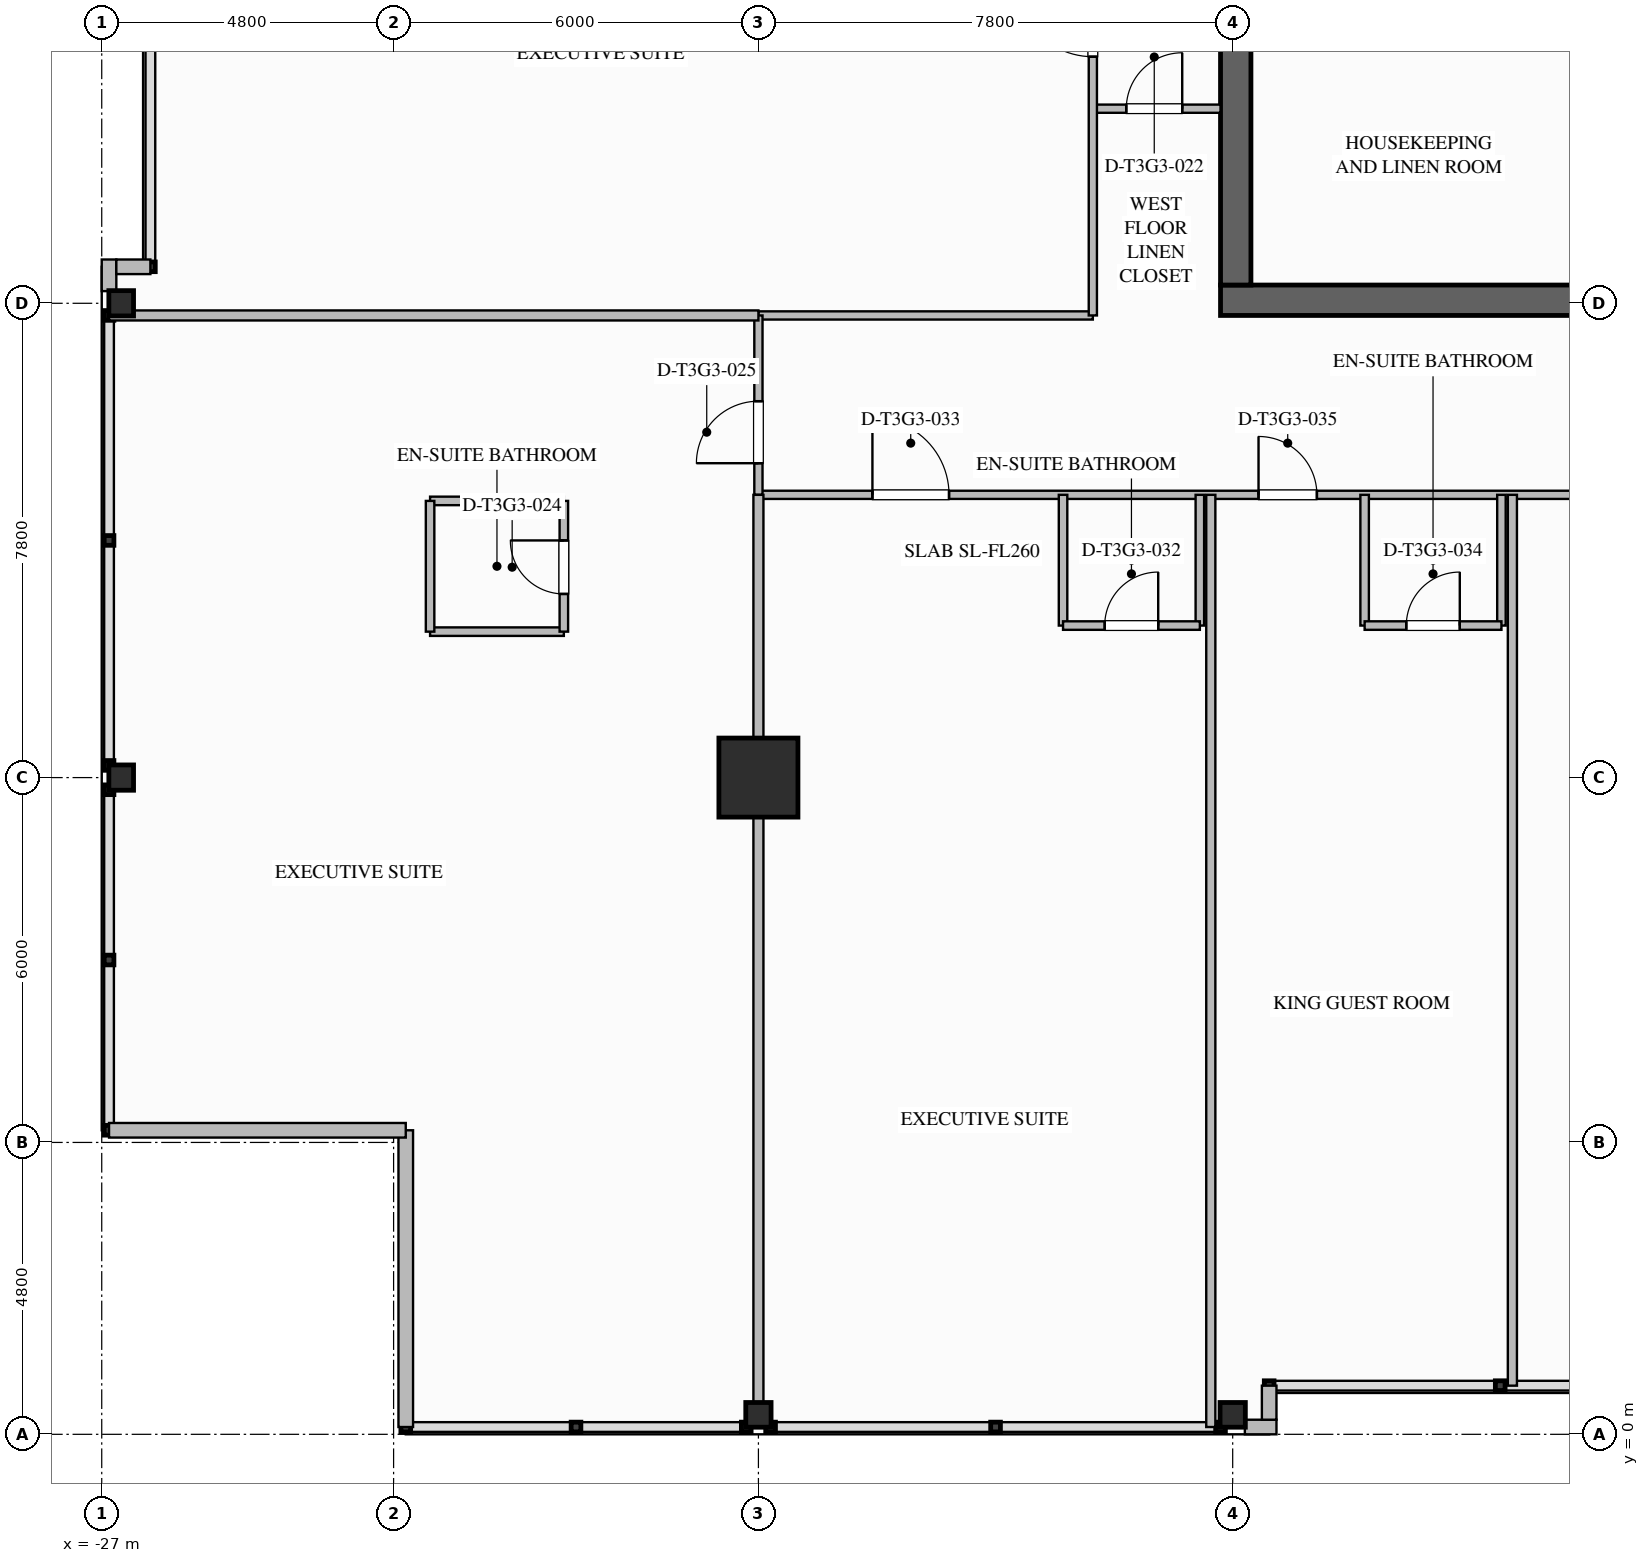
"""IFC4 building model, lengths in metres.
Left out: names, types, materials, properties, quantities, classifications, styles, units other than length and angle.
Written with IfcOpenShell. Run it as: python <this file> out.ifc"""

import sys

from ifc_helpers import new_model, si_unit, direction, frame, frame_2d, origin, origin_2d, place, context, subcontext, project, spatial, rectangle, i_section, extrude, element, fill, save


model = new_model("IFC4")
c1 = context("Model", 3, precision=1e-05, world=origin(), true_north=direction((0.0, 1.0)))
c2 = subcontext(c1, "Body", "Model", "MODEL_VIEW")
j1 = project(units=[si_unit("LENGTHUNIT", "METRE"), si_unit("PLANEANGLEUNIT", "RADIAN")], contexts=[c1])
p1 = place(None, origin())
s1 = spatial("IfcSite", under=j1, at=p1, CompositionType="ELEMENT")
p2 = place(p1, origin())
s2 = spatial("IfcBuilding", under=s1, at=p2, CompositionType="ELEMENT")
p3 = place(p2, frame((0.0, 0.0, 171.7)))
s3 = spatial("IfcBuildingStorey", under=s2, at=p3, CompositionType="ELEMENT", Elevation=171.7)
p4 = place(p3, frame((8.6, 18.65, 0.0), z_axis=(0.0, 0.0, 1.0), x_axis=(-1.0, 0.0, 0.0)))
e1 = element("IfcWall", 1, at=p4, inside=s3, PredefinedType="SHEAR", context=c2, shape_type="SweptSolid", body=[
    extrude(rectangle(XDim=17.2, YDim=0.5, at=frame_2d((8.6, 0.0))), origin(), (0.0, 0.0, 1.0), 3.55),
])
p5 = place(p3, frame((-8.35, 18.9, 0.0), z_axis=(0.0, 0.0, 1.0), x_axis=(0.0, 1.0, 0.0)))
e2 = element("IfcWall", 2, at=p5, inside=s3, PredefinedType="SHEAR", context=c2, shape_type="SweptSolid", body=[
    extrude(rectangle(XDim=16.2, YDim=0.5, at=frame_2d((8.1, 0.0))), origin(), (0.0, 0.0, 1.0), 3.55),
])
p6 = place(p5, frame((12.02, 0.0, 0.0)))
e3 = element("IfcOpeningElement", 3, at=p6, cuts=e2, PredefinedType="OPENING", context=c2, shape_type="SweptSolid", body=[
    extrude(rectangle(XDim=1.08, YDim=2.04, at=frame_2d((0.54, 1.02))), frame((0.0, 0.26, 0.0), z_axis=(0.0, -1.0, 0.0), x_axis=(1.0, 0.0, 0.0)), (0.0, 0.0, 1.0), 0.52),
])
p7 = place(p5, frame((4.5, 0.0, 0.0)))
e4 = element("IfcOpeningElement", 4, at=p7, cuts=e2, PredefinedType="OPENING", context=c2, shape_type="SweptSolid", body=[
    extrude(rectangle(XDim=1.08, YDim=2.04, at=frame_2d((0.54, 1.02))), frame((0.0, 0.26, 0.0), z_axis=(0.0, -1.0, 0.0), x_axis=(1.0, 0.0, 0.0)), (0.0, 0.0, 1.0), 0.52),
])
p8 = place(p3, frame((-16.2, 10.8, 0.0), z_axis=(0.0, 0.0, 1.0), x_axis=(1.0, 0.0, 0.0)))
e5 = element("IfcColumn", 5, at=p8, inside=s3, PredefinedType="COLUMN", context=c2, shape_type="SweptSolid", body=[
    extrude(rectangle(XDim=1.3, YDim=1.3, at=origin_2d()), origin(), (0.0, 0.0, 1.0), 3.55),
])
for number, where, z_axis, x_axis in (
    (6, (-26.68, 10.8, 0.0), (0.0, 0.0, 1.0), (1.0, 0.0, 0.0)),
    (7, (-26.68, 18.6, 0.0), (0.0, 0.0, 1.0), (1.0, 0.0, 0.0)),
    (8, (-16.2, 0.32, 0.0), (0.0, 0.0, 1.0), (0.0, 1.0, 0.0)),
    (9, (-8.4, 0.32, 0.0), (0.0, 0.0, 1.0), (0.0, 1.0, 0.0)),
):
    element("IfcColumn", number, at=place(p3, frame(where, z_axis=z_axis, x_axis=x_axis)), inside=s3, PredefinedType="COLUMN", context=c2, shape_type="SweptSolid", body=[
        extrude(i_section(OverallWidth=0.406, OverallDepth=0.416, WebThickness=0.03, FlangeThickness=0.048, FilletRadius=0.028, at=origin_2d()), origin(), (0.0, 0.0, 1.0), 3.547),
    ])
for number, where, z_axis, x_axis in (
    (10, (-26.88, 18.8, 0.0), (0.0, 0.0, 1.0), (0.0, 1.0, 0.0)),
    (11, (-7.68, 0.12, 0.0), (0.0, 0.0, 1.0), (-1.0, 0.0, 0.0)),
):
    element("IfcWall", number, at=place(p3, frame(where, z_axis=z_axis, x_axis=x_axis)), inside=s3, PredefinedType="STANDARD", context=c2, shape_type="SweptSolid", body=[
        extrude(rectangle(XDim=0.52, YDim=0.24, at=frame_2d((0.26, 0.0))), origin(), (0.0, 0.0, 1.0), 3.29),
    ])
for number, where, z_axis, x_axis in (
    (12, (-22.0, 0.12, 0.0), (0.0, 0.0, 1.0), (0.0, 1.0, 0.0)),
    (13, (-22.0, 5.0, 0.0), (0.0, 0.0, 1.0), (-1.0, 0.0, 0.0)),
):
    element("IfcWall", number, at=place(p3, frame(where, z_axis=z_axis, x_axis=x_axis)), inside=s3, PredefinedType="STANDARD", context=c2, shape_type="SweptSolid", body=[
        extrude(rectangle(XDim=4.88, YDim=0.24, at=frame_2d((2.44, 0.0))), origin(), (0.0, 0.0, 1.0), 3.29),
    ])
for number, where, z_axis, x_axis in (
    (14, (-26.76, 19.2, 0.0), (0.0, 0.0, 1.0), (1.0, 0.0, 0.0)),
    (15, (-7.8, 0.8, 0.0), (0.0, 0.0, 1.0), (0.0, -1.0, 0.0)),
):
    element("IfcWall", number, at=place(p3, frame(where, z_axis=z_axis, x_axis=x_axis)), inside=s3, PredefinedType="STANDARD", context=c2, shape_type="SweptSolid", body=[
        extrude(rectangle(XDim=0.56, YDim=0.24, at=frame_2d((0.28, 0.0))), origin(), (0.0, 0.0, 1.0), 3.29),
    ])
p9 = place(p3, frame((-10.7, 21.8, 0.0), z_axis=(0.0, 0.0, 1.0), x_axis=(1.0, 0.0, 0.0)))
e16 = element("IfcWall", 16, at=p9, inside=s3, PredefinedType="PARTITIONING", context=c2, shape_type="SweptSolid", body=[
    extrude(rectangle(XDim=2.1, YDim=0.135, at=frame_2d((1.05, 0.0))), origin(), (0.0, 0.0, 1.0), 3.29),
])
p10 = place(p9, frame((0.55, 0.0, 0.0)))
e17 = element("IfcOpeningElement", 17, at=p10, cuts=e16, PredefinedType="OPENING", context=c2, shape_type="SweptSolid", body=[
    extrude(rectangle(XDim=0.92, YDim=2.1, at=frame_2d((0.46, 1.05))), frame((0.0, 0.077, 0.0), z_axis=(0.0, -1.0, 0.0), x_axis=(1.0, 0.0, 0.0)), (0.0, 0.0, 1.0), 0.155),
])
p11 = place(p3, frame((-16.2, 18.4, 0.0), z_axis=(0.0, 0.0, 1.0), x_axis=(1.0, 0.0, 0.0)))
e18 = element("IfcWall", 18, at=p11, inside=s3, PredefinedType="PARTITIONING", context=c2, shape_type="SweptSolid", body=[
    extrude(rectangle(XDim=5.5, YDim=0.135, at=frame_2d((2.75, 0.0))), origin(), (0.0, 0.0, 1.0), 2.667),
])
p12 = place(p3, frame((-16.2, 15.45, 0.0), z_axis=(0.0, 0.0, 1.0), x_axis=(1.0, 0.0, 0.0)))
e19 = element("IfcWall", 19, at=p12, inside=s3, PredefinedType="PARTITIONING", context=c2, shape_type="SweptSolid", body=[
    extrude(rectangle(XDim=24.8, YDim=0.135, at=frame_2d((12.4, 0.0))), origin(), (0.0, 0.0, 1.0), 3.29),
])
p13 = place(p12, frame((1.875, 0.0, 0.0)))
e20 = element("IfcOpeningElement", 20, at=p13, cuts=e19, PredefinedType="OPENING", context=c2, shape_type="SweptSolid", body=[
    extrude(rectangle(XDim=1.26, YDim=2.2, at=frame_2d((0.63, 1.1))), frame((0.0, 0.077, 0.0), z_axis=(0.0, -1.0, 0.0), x_axis=(1.0, 0.0, 0.0)), (0.0, 0.0, 1.0), 0.155),
])
p14 = place(p12, frame((8.225, 0.0, 0.0)))
e21 = element("IfcOpeningElement", 21, at=p14, cuts=e19, PredefinedType="OPENING", context=c2, shape_type="SweptSolid", body=[
    extrude(rectangle(XDim=0.96, YDim=2.15, at=frame_2d((0.48, 1.075))), frame((0.0, 0.077, 0.0), z_axis=(0.0, -1.0, 0.0), x_axis=(1.0, 0.0, 0.0)), (0.0, 0.0, 1.0), 0.155),
])
p15 = place(p12, frame((13.745, 0.0, 0.0)))
e22 = element("IfcOpeningElement", 22, at=p15, cuts=e19, PredefinedType="OPENING", context=c2, shape_type="SweptSolid", body=[
    extrude(rectangle(XDim=1.26, YDim=2.2, at=frame_2d((0.63, 1.1))), frame((0.0, 0.077, 0.0), z_axis=(0.0, -1.0, 0.0), x_axis=(1.0, 0.0, 0.0)), (0.0, 0.0, 1.0), 0.155),
])
p16 = place(p12, frame((19.945, 0.0, 0.0)))
e23 = element("IfcOpeningElement", 23, at=p16, cuts=e19, PredefinedType="OPENING", context=c2, shape_type="SweptSolid", body=[
    extrude(rectangle(XDim=1.26, YDim=2.2, at=frame_2d((0.63, 1.1))), frame((0.0, 0.077, 0.0), z_axis=(0.0, -1.0, 0.0), x_axis=(1.0, 0.0, 0.0)), (0.0, 0.0, 1.0), 0.155),
])
p17 = place(p3, frame((-10.7, 18.4, 0.0), z_axis=(0.0, 0.0, 1.0), x_axis=(0.0, 1.0, 0.0)))
e24 = element("IfcWall", 24, at=p17, inside=s3, PredefinedType="PARTITIONING", context=c2, shape_type="SweptSolid", body=[
    extrude(rectangle(XDim=17.2, YDim=0.135, at=frame_2d((8.6, 0.0))), origin(), (0.0, 0.0, 1.0), 3.29),
])
p18 = place(p17, frame((4.255, 0.0, 0.0)))
e25 = element("IfcOpeningElement", 25, at=p18, cuts=e24, PredefinedType="OPENING", context=c2, shape_type="SweptSolid", body=[
    extrude(rectangle(XDim=1.26, YDim=2.2, at=frame_2d((0.63, 1.1))), frame((0.0, 0.077, 0.0), z_axis=(0.0, -1.0, 0.0), x_axis=(1.0, 0.0, 0.0)), (0.0, 0.0, 1.0), 0.155),
])
p19 = place(p17, frame((9.255, 0.0, 0.0)))
e26 = element("IfcOpeningElement", 26, at=p19, cuts=e24, PredefinedType="OPENING", context=c2, shape_type="SweptSolid", body=[
    extrude(rectangle(XDim=1.26, YDim=2.2, at=frame_2d((0.63, 1.1))), frame((0.0, 0.077, 0.0), z_axis=(0.0, -1.0, 0.0), x_axis=(1.0, 0.0, 0.0)), (0.0, 0.0, 1.0), 0.155),
])
p20 = place(p3, frame((-16.2, 15.45, 0.0), z_axis=(0.0, 0.0, 1.0), x_axis=(0.0, 1.0, 0.0)))
e27 = element("IfcWall", 27, at=p20, inside=s3, PredefinedType="PARTITIONING", context=c2, shape_type="SweptSolid", body=[
    extrude(rectangle(XDim=2.95, YDim=0.135, at=frame_2d((1.475, 0.0))), origin(), (0.0, 0.0, 1.0), 2.58),
])
p21 = place(p20, frame((0.52, 0.0, 0.0)))
e28 = element("IfcOpeningElement", 28, at=p21, cuts=e27, PredefinedType="OPENING", context=c2, shape_type="SweptSolid", body=[
    extrude(rectangle(XDim=1.02, YDim=2.15, at=frame_2d((0.51, 1.075))), frame((0.0, 0.077, 0.0), z_axis=(0.0, -1.0, 0.0), x_axis=(1.0, 0.0, 0.0)), (0.0, 0.0, 1.0), 0.155),
])
p22 = place(p3, frame((-16.2, 0.12, 0.0), z_axis=(0.0, 0.0, 1.0), x_axis=(0.0, 1.0, 0.0)))
e29 = element("IfcWall", 29, at=p22, inside=s3, PredefinedType="PARTITIONING", context=c2, shape_type="SweptSolid", body=[
    extrude(rectangle(XDim=15.33, YDim=0.165, at=frame_2d((7.665, 0.0))), origin(), (0.0, 0.0, 1.0), 2.58),
])
p23 = place(p3, frame((-26.88, 18.4, 0.0), z_axis=(0.0, 0.0, 1.0), x_axis=(1.0, 0.0, 0.0)))
e30 = element("IfcWall", 30, at=p23, inside=s3, PredefinedType="PARTITIONING", context=c2, shape_type="SweptSolid", body=[
    extrude(rectangle(XDim=10.68, YDim=0.165, at=frame_2d((5.34, 0.0))), origin(), (0.0, 0.0, 1.0), 2.58),
])
for number, where, z_axis, x_axis in (
    (31, (-21.6, 13.2, 0.0), (0.0, 0.0, 1.0), (1.0, 0.0, 0.0)),
    (32, (-21.6, 15.35, 0.0), (0.0, 0.0, 1.0), (1.0, 0.0, 0.0)),
):
    element("IfcWall", number, at=place(p3, frame(where, z_axis=z_axis, x_axis=x_axis)), inside=s3, PredefinedType="PLUMBINGWALL", context=c2, shape_type="SweptSolid", body=[
        extrude(rectangle(XDim=2.2, YDim=0.14, at=frame_2d((1.1, 0.0))), origin(), (0.0, 0.0, 1.0), 3.29),
    ])
p24 = place(p3, frame((-21.6, 13.2, 0.0), z_axis=(0.0, 0.0, 1.0), x_axis=(0.0, 1.0, 0.0)))
e33 = element("IfcWall", 33, at=p24, inside=s3, PredefinedType="PLUMBINGWALL", context=c2, shape_type="SweptSolid", body=[
    extrude(rectangle(XDim=2.15, YDim=0.14, at=frame_2d((1.075, 0.0))), origin(), (0.0, 0.0, 1.0), 3.29),
])
p25 = place(p3, frame((-19.4, 13.2, 0.0), z_axis=(0.0, 0.0, 1.0), x_axis=(0.0, 1.0, 0.0)))
e34 = element("IfcWall", 34, at=p25, inside=s3, PredefinedType="PLUMBINGWALL", context=c2, shape_type="SweptSolid", body=[
    extrude(rectangle(XDim=2.15, YDim=0.14, at=frame_2d((1.075, 0.0))), origin(), (0.0, 0.0, 1.0), 3.29),
])
p26 = place(p25, frame((0.62, 0.0, 0.0)))
e35 = element("IfcOpeningElement", 35, at=p26, cuts=e34, PredefinedType="OPENING", context=c2, shape_type="SweptSolid", body=[
    extrude(rectangle(XDim=0.88, YDim=2.1, at=frame_2d((0.44, 1.05))), frame((0.0, 0.08, 0.0), z_axis=(0.0, -1.0, 0.0), x_axis=(1.0, 0.0, 0.0)), (0.0, 0.0, 1.0), 0.16),
])
for number, where, z_axis, x_axis in (
    (36, (-11.19, 15.45, 0.0), (0.0, 0.0, 1.0), (0.0, -1.0, 0.0)),
    (37, (-8.94, 15.45, 0.0), (0.0, 0.0, 1.0), (0.0, -1.0, 0.0)),
):
    element("IfcWall", number, at=place(p3, frame(where, z_axis=z_axis, x_axis=x_axis)), inside=s3, PredefinedType="PLUMBINGWALL", context=c2, shape_type="SweptSolid", body=[
        extrude(rectangle(XDim=2.15, YDim=0.14, at=frame_2d((1.075, 0.0))), origin(), (0.0, 0.0, 1.0), 3.29),
    ])
p27 = place(p3, frame((-11.19, 13.3, 0.0), z_axis=(0.0, 0.0, 1.0), x_axis=(1.0, 0.0, 0.0)))
e38 = element("IfcWall", 38, at=p27, inside=s3, PredefinedType="PLUMBINGWALL", context=c2, shape_type="SweptSolid", body=[
    extrude(rectangle(XDim=2.25, YDim=0.14, at=frame_2d((1.125, 0.0))), origin(), (0.0, 0.0, 1.0), 3.29),
])
p28 = place(p27, frame((0.685, 0.0, 0.0)))
e39 = element("IfcOpeningElement", 39, at=p28, cuts=e38, PredefinedType="OPENING", context=c2, shape_type="SweptSolid", body=[
    extrude(rectangle(XDim=0.88, YDim=2.1, at=frame_2d((0.44, 1.05))), frame((0.0, 0.08, 0.0), z_axis=(0.0, -1.0, 0.0), x_axis=(1.0, 0.0, 0.0)), (0.0, 0.0, 1.0), 0.16),
])
p29 = place(p3, frame((-8.76, 0.12, 0.0), z_axis=(0.0, 0.0, 1.0), x_axis=(0.0, 1.0, 0.0)))
e40 = element("IfcWall", 40, at=p29, inside=s3, PredefinedType="PARTITIONING", context=c2, shape_type="SweptSolid", body=[
    extrude(rectangle(XDim=15.33, YDim=0.15, at=frame_2d((7.665, 0.0))), origin(), (0.0, 0.0, 1.0), 3.29),
])
for number, where, z_axis, x_axis in (
    (41, (-6.23, 15.45, 0.0), (0.0, 0.0, 1.0), (0.0, -1.0, 0.0)),
    (42, (-3.98, 15.45, 0.0), (0.0, 0.0, 1.0), (0.0, -1.0, 0.0)),
):
    element("IfcWall", number, at=place(p3, frame(where, z_axis=z_axis, x_axis=x_axis)), inside=s3, PredefinedType="PLUMBINGWALL", context=c2, shape_type="SweptSolid", body=[
        extrude(rectangle(XDim=2.15, YDim=0.14, at=frame_2d((1.075, 0.0))), origin(), (0.0, 0.0, 1.0), 3.29),
    ])
p30 = place(p3, frame((-6.23, 13.3, 0.0), z_axis=(0.0, 0.0, 1.0), x_axis=(1.0, 0.0, 0.0)))
e43 = element("IfcWall", 43, at=p30, inside=s3, PredefinedType="PLUMBINGWALL", context=c2, shape_type="SweptSolid", body=[
    extrude(rectangle(XDim=2.25, YDim=0.14, at=frame_2d((1.125, 0.0))), origin(), (0.0, 0.0, 1.0), 3.29),
])
p31 = place(p30, frame((0.685, 0.0, 0.0)))
e44 = element("IfcOpeningElement", 44, at=p31, cuts=e43, PredefinedType="OPENING", context=c2, shape_type="SweptSolid", body=[
    extrude(rectangle(XDim=0.88, YDim=2.1, at=frame_2d((0.44, 1.05))), frame((0.0, 0.08, 0.0), z_axis=(0.0, -1.0, 0.0), x_axis=(1.0, 0.0, 0.0)), (0.0, 0.0, 1.0), 0.16),
])
p32 = place(p3, frame((-3.8, 0.8, 0.0), z_axis=(0.0, 0.0, 1.0), x_axis=(0.0, 1.0, 0.0)))
e45 = element("IfcWall", 45, at=p32, inside=s3, PredefinedType="PARTITIONING", context=c2, shape_type="SweptSolid", body=[
    extrude(rectangle(XDim=14.65, YDim=0.15, at=frame_2d((7.325, 0.0))), origin(), (0.0, 0.0, 1.0), 3.29),
])
p33 = place(p10, origin())
e46 = element("IfcDoor", 46, at=p33, inside=s3, OperationType="SINGLE_SWING_RIGHT", PredefinedType="DOOR", context=c2, shape_type="SweptSolid", body=[
    extrude(rectangle(XDim=0.92, YDim=2.1, at=frame_2d((0.46, 1.05))), frame((0.0, 0.025, 0.0), z_axis=(0.0, -1.0, 0.0), x_axis=(1.0, 0.0, 0.0)), (0.0, 0.0, 1.0), 0.05),
])
fill(e17, e46)
p34 = place(p26, origin())
e47 = element("IfcDoor", 47, at=p34, inside=s3, OperationType="SINGLE_SWING_RIGHT", PredefinedType="DOOR", context=c2, shape_type="SweptSolid", body=[
    extrude(rectangle(XDim=0.88, YDim=2.1, at=frame_2d((0.44, 1.05))), frame((0.0, 0.025, 0.0), z_axis=(0.0, -1.0, 0.0), x_axis=(1.0, 0.0, 0.0)), (0.0, 0.0, 1.0), 0.05),
])
fill(e35, e47)
p35 = place(p21, origin())
e48 = element("IfcDoor", 48, at=p35, inside=s3, OperationType="SINGLE_SWING_LEFT", PredefinedType="DOOR", context=c2, shape_type="SweptSolid", body=[
    extrude(rectangle(XDim=1.02, YDim=2.15, at=frame_2d((0.51, 1.075))), frame((0.0, 0.025, 0.0), z_axis=(0.0, -1.0, 0.0), x_axis=(1.0, 0.0, 0.0)), (0.0, 0.0, 1.0), 0.05),
])
fill(e28, e48)
p36 = place(p28, origin())
e49 = element("IfcDoor", 49, at=p36, inside=s3, OperationType="SINGLE_SWING_RIGHT", PredefinedType="DOOR", context=c2, shape_type="SweptSolid", body=[
    extrude(rectangle(XDim=0.88, YDim=2.1, at=frame_2d((0.44, 1.05))), frame((0.0, 0.025, 0.0), z_axis=(0.0, -1.0, 0.0), x_axis=(1.0, 0.0, 0.0)), (0.0, 0.0, 1.0), 0.05),
])
fill(e39, e49)
p37 = place(p13, origin())
e50 = element("IfcDoor", 50, at=p37, inside=s3, OperationType="SINGLE_SWING_LEFT", PredefinedType="DOOR", context=c2, shape_type="SweptSolid", body=[
    extrude(rectangle(XDim=1.26, YDim=2.2, at=frame_2d((0.63, 1.1))), frame((0.0, 0.025, 0.0), z_axis=(0.0, -1.0, 0.0), x_axis=(1.0, 0.0, 0.0)), (0.0, 0.0, 1.0), 0.05),
])
fill(e20, e50)
p38 = place(p31, origin())
e51 = element("IfcDoor", 51, at=p38, inside=s3, OperationType="SINGLE_SWING_RIGHT", PredefinedType="DOOR", context=c2, shape_type="SweptSolid", body=[
    extrude(rectangle(XDim=0.88, YDim=2.1, at=frame_2d((0.44, 1.05))), frame((0.0, 0.025, 0.0), z_axis=(0.0, -1.0, 0.0), x_axis=(1.0, 0.0, 0.0)), (0.0, 0.0, 1.0), 0.05),
])
fill(e44, e51)
p39 = place(p14, origin())
e52 = element("IfcDoor", 52, at=p39, inside=s3, OperationType="SINGLE_SWING_LEFT", PredefinedType="DOOR", context=c2, shape_type="SweptSolid", body=[
    extrude(rectangle(XDim=0.96, YDim=2.15, at=frame_2d((0.48, 1.075))), frame((0.0, 0.025, 0.0), z_axis=(0.0, -1.0, 0.0), x_axis=(1.0, 0.0, 0.0)), (0.0, 0.0, 1.0), 0.05),
])
fill(e21, e52)
p40 = place(p18, origin())
e53 = element("IfcDoor", 53, at=p40, inside=s3, OperationType="SINGLE_SWING_RIGHT", PredefinedType="DOOR", context=c2, shape_type="SweptSolid", body=[
    extrude(rectangle(XDim=1.26, YDim=2.2, at=frame_2d((0.63, 1.1))), frame((0.0, 0.025, 0.0), z_axis=(0.0, -1.0, 0.0), x_axis=(1.0, 0.0, 0.0)), (0.0, 0.0, 1.0), 0.05),
])
fill(e25, e53)
save(model, sys.argv[1])
